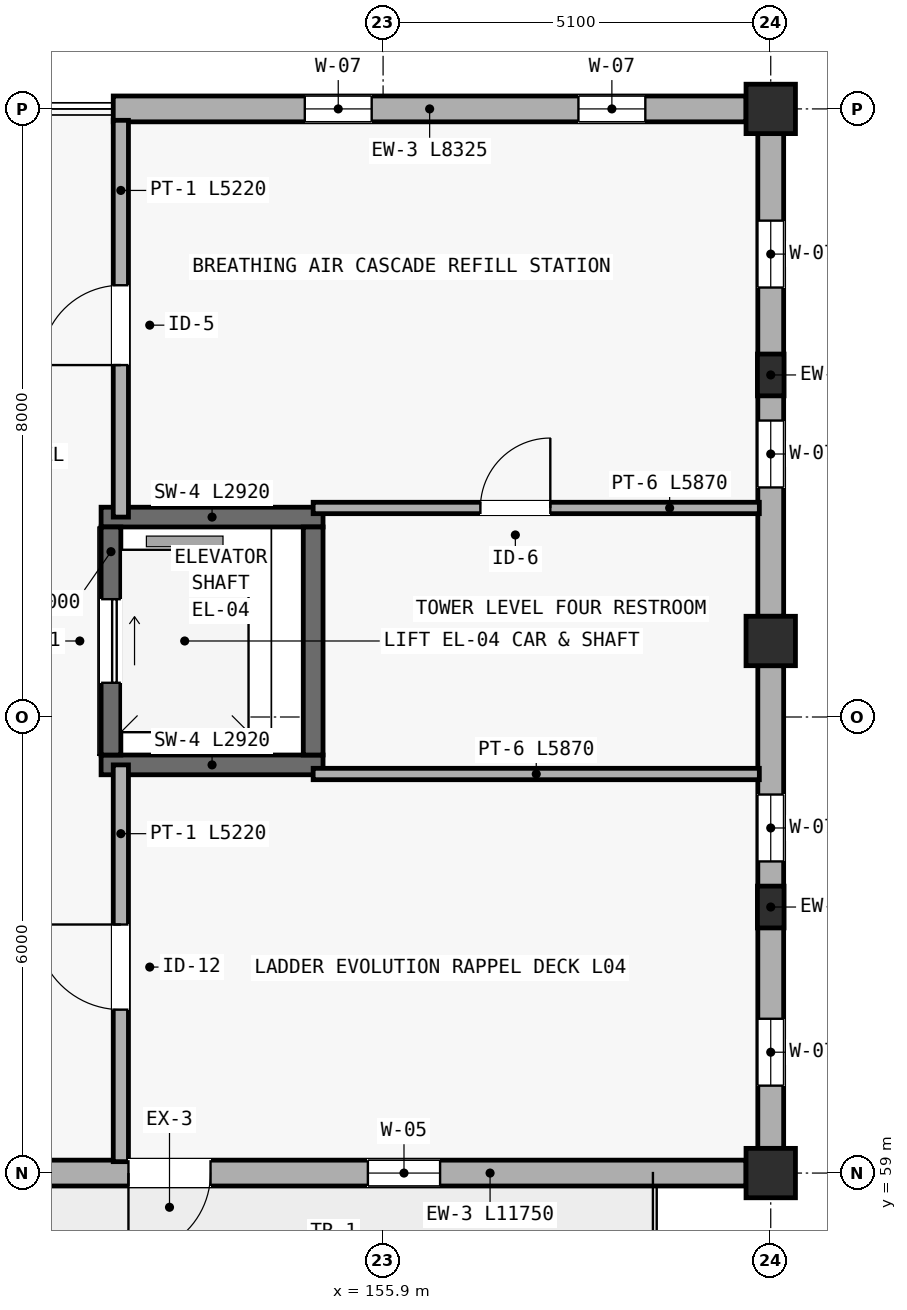
"""IFC4 building model, lengths in metres.
Left out: names, types, materials, properties, quantities, classifications, styles, units other than length and angle.
Written with IfcOpenShell. Run it as: python <this file> out.ifc"""

import sys

from ifc_helpers import new_model, si_unit, direction, frame, frame_2d, origin, origin_2d, place, context, subcontext, project, spatial, rectangle, extrude, element, fill, save


model = new_model("IFC4")
c1 = context("Model", 3, precision=1e-05, world=origin(), true_north=direction((0.0, 1.0)))
c2 = subcontext(c1, "Body", "Model", "MODEL_VIEW")
j1 = project(units=[si_unit("LENGTHUNIT", "METRE"), si_unit("PLANEANGLEUNIT", "RADIAN")], contexts=[c1])
p1 = place(None, origin())
s1 = spatial("IfcSite", under=j1, at=p1, CompositionType="ELEMENT")
p2 = place(p1, origin())
s2 = spatial("IfcBuilding", under=s1, at=p2, CompositionType="ELEMENT")
p3 = place(p2, frame((0.0, 0.0, 12.75)))
s3 = spatial("IfcBuildingStorey", under=s2, at=p3, CompositionType="ELEMENT", Elevation=12.75)
for number, where, z_axis, x_axis in (
    (1, (161.0, 59.0, 0.0), (0.0, 0.0, 1.0), (1.0, 0.0, 0.0)),
    (2, (161.0, 66.0, 0.0), (0.0, 0.0, 1.0), (1.0, 0.0, 0.0)),
    (3, (161.0, 73.0, 0.0), (0.0, 0.0, 1.0), (1.0, 0.0, 0.0)),
):
    element("IfcColumn", number, at=place(p3, frame(where, z_axis=z_axis, x_axis=x_axis)), inside=s3, PredefinedType="COLUMN", context=c2, shape_type="SweptSolid", body=[
        extrude(rectangle(XDim=0.65, YDim=0.65, at=origin_2d()), origin(), (0.0, 0.0, 1.0), 4.65),
    ])
for number, where, z_axis, x_axis in (
    (4, (161.0, 62.5, 0.0), (0.0, 0.0, 1.0), (1.0, 0.0, 0.0)),
    (5, (161.0, 69.5, 0.0), (0.0, 0.0, 1.0), (1.0, 0.0, 0.0)),
):
    element("IfcColumn", number, at=place(p3, frame(where, z_axis=z_axis, x_axis=x_axis)), inside=s3, PredefinedType="PILASTER", context=c2, shape_type="SweptSolid", body=[
        extrude(rectangle(XDim=0.35, YDim=0.55, at=origin_2d()), origin(), (0.0, 0.0, 1.0), 4.65),
    ])
p4 = place(p3, frame((148.925, 59.0, 0.0), z_axis=(0.0, 0.0, 1.0), x_axis=(1.0, 0.0, 0.0)))
e6 = element("IfcWall", 6, at=p4, inside=s3, PredefinedType="STANDARD", context=c2, shape_type="SweptSolid", body=[
    extrude(rectangle(XDim=11.75, YDim=0.34, at=frame_2d((5.875, 0.0))), origin(), (0.0, 0.0, 1.0), 3.95),
])
p5 = place(p4, frame((3.625, 0.0, 0.0)))
e7 = element("IfcOpeningElement", 7, at=p5, cuts=e6, PredefinedType="OPENING", context=c2, shape_type="SweptSolid", body=[
    extrude(rectangle(XDim=1.08, YDim=2.1, at=frame_2d((0.54, 1.05))), frame((0.0, 0.18, 0.0), z_axis=(0.0, -1.0, 0.0), x_axis=(1.0, 0.0, 0.0)), (0.0, 0.0, 1.0), 0.36),
])
p6 = place(p4, frame((1.175, 0.0, 0.75)))
e8 = element("IfcOpeningElement", 8, at=p6, cuts=e6, PredefinedType="OPENING", context=c2, shape_type="SweptSolid", body=[
    extrude(rectangle(XDim=0.95, YDim=1.35, at=frame_2d((0.475, 0.675))), frame((0.0, 0.18, 0.0), z_axis=(0.0, -1.0, 0.0), x_axis=(1.0, 0.0, 0.0)), (0.0, 0.0, 1.0), 0.36),
])
p7 = place(p4, frame((6.775, 0.0, 0.75)))
e9 = element("IfcOpeningElement", 9, at=p7, cuts=e6, PredefinedType="OPENING", context=c2, shape_type="SweptSolid", body=[
    extrude(rectangle(XDim=0.95, YDim=1.35, at=frame_2d((0.475, 0.675))), frame((0.0, 0.18, 0.0), z_axis=(0.0, -1.0, 0.0), x_axis=(1.0, 0.0, 0.0)), (0.0, 0.0, 1.0), 0.36),
])
p8 = place(p3, frame((160.675, 73.0, 0.0), z_axis=(0.0, 0.0, 1.0), x_axis=(-1.0, 0.0, 0.0)))
e10 = element("IfcWall", 10, at=p8, inside=s3, PredefinedType="STANDARD", context=c2, shape_type="SweptSolid", body=[
    extrude(rectangle(XDim=8.325, YDim=0.34, at=frame_2d((4.163, 0.0))), origin(), (0.0, 0.0, 1.0), 3.95),
])
p9 = place(p8, frame((1.325, 0.0, 0.75)))
e11 = element("IfcOpeningElement", 11, at=p9, cuts=e10, PredefinedType="OPENING", context=c2, shape_type="SweptSolid", body=[
    extrude(rectangle(XDim=0.88, YDim=1.5, at=frame_2d((0.44, 0.75))), frame((0.0, 0.18, 0.0), z_axis=(0.0, -1.0, 0.0), x_axis=(1.0, 0.0, 0.0)), (0.0, 0.0, 1.0), 0.36),
])
p10 = place(p8, frame((4.925, 0.0, 0.75)))
e12 = element("IfcOpeningElement", 12, at=p10, cuts=e10, PredefinedType="OPENING", context=c2, shape_type="SweptSolid", body=[
    extrude(rectangle(XDim=0.88, YDim=1.5, at=frame_2d((0.44, 0.75))), frame((0.0, 0.18, 0.0), z_axis=(0.0, -1.0, 0.0), x_axis=(1.0, 0.0, 0.0)), (0.0, 0.0, 1.0), 0.36),
])
p11 = place(p3, frame((161.0, 59.325, 0.0), z_axis=(0.0, 0.0, 1.0), x_axis=(0.0, 1.0, 0.0)))
e13 = element("IfcWall", 13, at=p11, inside=s3, PredefinedType="STANDARD", context=c2, shape_type="SweptSolid", body=[
    extrude(rectangle(XDim=6.35, YDim=0.34, at=frame_2d((3.175, 0.0))), origin(), (0.0, 0.0, 1.0), 3.95),
])
p12 = place(p11, frame((0.825, 0.0, 0.75)))
e14 = element("IfcOpeningElement", 14, at=p12, cuts=e13, PredefinedType="OPENING", context=c2, shape_type="SweptSolid", body=[
    extrude(rectangle(XDim=0.88, YDim=1.5, at=frame_2d((0.44, 0.75))), frame((0.0, 0.18, 0.0), z_axis=(0.0, -1.0, 0.0), x_axis=(1.0, 0.0, 0.0)), (0.0, 0.0, 1.0), 0.36),
])
p13 = place(p11, frame((3.775, 0.0, 0.75)))
e15 = element("IfcOpeningElement", 15, at=p13, cuts=e13, PredefinedType="OPENING", context=c2, shape_type="SweptSolid", body=[
    extrude(rectangle(XDim=0.88, YDim=1.5, at=frame_2d((0.44, 0.75))), frame((0.0, 0.18, 0.0), z_axis=(0.0, -1.0, 0.0), x_axis=(1.0, 0.0, 0.0)), (0.0, 0.0, 1.0), 0.36),
])
p14 = place(p3, frame((161.0, 66.325, 0.0), z_axis=(0.0, 0.0, 1.0), x_axis=(0.0, 1.0, 0.0)))
e16 = element("IfcWall", 16, at=p14, inside=s3, PredefinedType="STANDARD", context=c2, shape_type="SweptSolid", body=[
    extrude(rectangle(XDim=6.35, YDim=0.34, at=frame_2d((3.175, 0.0))), origin(), (0.0, 0.0, 1.0), 3.95),
])
p15 = place(p14, frame((1.695, 0.0, 0.75)))
e17 = element("IfcOpeningElement", 17, at=p15, cuts=e16, PredefinedType="OPENING", context=c2, shape_type="SweptSolid", body=[
    extrude(rectangle(XDim=0.88, YDim=1.5, at=frame_2d((0.44, 0.75))), frame((0.0, 0.18, 0.0), z_axis=(0.0, -1.0, 0.0), x_axis=(1.0, 0.0, 0.0)), (0.0, 0.0, 1.0), 0.36),
])
p16 = place(p14, frame((4.325, 0.0, 0.75)))
e18 = element("IfcOpeningElement", 18, at=p16, cuts=e16, PredefinedType="OPENING", context=c2, shape_type="SweptSolid", body=[
    extrude(rectangle(XDim=0.88, YDim=1.5, at=frame_2d((0.44, 0.75))), frame((0.0, 0.18, 0.0), z_axis=(0.0, -1.0, 0.0), x_axis=(1.0, 0.0, 0.0)), (0.0, 0.0, 1.0), 0.36),
])
for number, where, z_axis, x_axis in (
    (19, (152.19, 64.37, 0.0), (0.0, 0.0, 1.0), (1.0, 0.0, 0.0)),
    (20, (155.11, 67.63, 0.0), (0.0, 0.0, 1.0), (-1.0, 0.0, 0.0)),
):
    element("IfcWall", number, at=place(p3, frame(where, z_axis=z_axis, x_axis=x_axis)), inside=s3, PredefinedType="SHEAR", context=c2, shape_type="SweptSolid", body=[
        extrude(rectangle(XDim=2.92, YDim=0.26, at=frame_2d((1.46, 0.0))), origin(), (0.0, 0.0, 1.0), 4.4),
    ])
p17 = place(p3, frame((152.32, 67.5, 0.0), z_axis=(0.0, 0.0, 1.0), x_axis=(0.0, -1.0, 0.0)))
e21 = element("IfcWall", 21, at=p17, inside=s3, PredefinedType="SHEAR", context=c2, shape_type="SweptSolid", body=[
    extrude(rectangle(XDim=3.0, YDim=0.26, at=frame_2d((1.5, 0.0))), origin(), (0.0, 0.0, 1.0), 4.4),
])
p18 = place(p17, frame((0.95, 0.0, 0.0)))
e22 = element("IfcOpeningElement", 22, at=p18, cuts=e21, PredefinedType="OPENING", context=c2, shape_type="SweptSolid", body=[
    extrude(rectangle(XDim=1.1, YDim=2.15, at=frame_2d((0.55, 1.075))), frame((0.0, 0.14, 0.0), z_axis=(0.0, -1.0, 0.0), x_axis=(1.0, 0.0, 0.0)), (0.0, 0.0, 1.0), 0.28),
])
p19 = place(p3, frame((154.98, 64.5, 0.0), z_axis=(0.0, 0.0, 1.0), x_axis=(0.0, 1.0, 0.0)))
e23 = element("IfcWall", 23, at=p19, inside=s3, PredefinedType="SHEAR", context=c2, shape_type="SweptSolid", body=[
    extrude(rectangle(XDim=3.0, YDim=0.26, at=frame_2d((1.5, 0.0))), origin(), (0.0, 0.0, 1.0), 4.4),
])
p20 = place(p3, frame((152.45, 59.15, 0.0), z_axis=(0.0, 0.0, 1.0), x_axis=(0.0, 1.0, 0.0)))
e24 = element("IfcWall", 24, at=p20, inside=s3, PredefinedType="PARTITIONING", context=c2, shape_type="SweptSolid", body=[
    extrude(rectangle(XDim=5.22, YDim=0.2, at=frame_2d((2.61, 0.0))), origin(), (0.0, 0.0, 1.0), 3.9),
])
p21 = place(p20, frame((2.0, 0.0, 0.0)))
e25 = element("IfcOpeningElement", 25, at=p21, cuts=e24, PredefinedType="OPENING", context=c2, shape_type="SweptSolid", body=[
    extrude(rectangle(XDim=1.12, YDim=2.15, at=frame_2d((0.56, 1.075))), frame((0.0, 0.11, 0.0), z_axis=(0.0, -1.0, 0.0), x_axis=(1.0, 0.0, 0.0)), (0.0, 0.0, 1.0), 0.22),
])
p22 = place(p3, frame((152.45, 67.63, 0.0), z_axis=(0.0, 0.0, 1.0), x_axis=(0.0, 1.0, 0.0)))
e26 = element("IfcWall", 26, at=p22, inside=s3, PredefinedType="PARTITIONING", context=c2, shape_type="SweptSolid", body=[
    extrude(rectangle(XDim=5.22, YDim=0.2, at=frame_2d((2.61, 0.0))), origin(), (0.0, 0.0, 1.0), 3.9),
])
p23 = place(p22, frame((2.0, 0.0, 0.0)))
e27 = element("IfcOpeningElement", 27, at=p23, cuts=e26, PredefinedType="OPENING", context=c2, shape_type="SweptSolid", body=[
    extrude(rectangle(XDim=1.05, YDim=2.14, at=frame_2d((0.525, 1.07))), frame((0.0, 0.11, 0.0), z_axis=(0.0, -1.0, 0.0), x_axis=(1.0, 0.0, 0.0)), (0.0, 0.0, 1.0), 0.22),
])
p24 = place(p3, frame((154.98, 64.25, 0.0), z_axis=(0.0, 0.0, 1.0), x_axis=(1.0, 0.0, 0.0)))
e28 = element("IfcWall", 28, at=p24, inside=s3, PredefinedType="PARTITIONING", context=c2, shape_type="SweptSolid", body=[
    extrude(rectangle(XDim=5.87, YDim=0.15, at=frame_2d((2.935, 0.0))), origin(), (0.0, 0.0, 1.0), 3.9),
])
p25 = place(p3, frame((154.98, 67.75, 0.0), z_axis=(0.0, 0.0, 1.0), x_axis=(1.0, 0.0, 0.0)))
e29 = element("IfcWall", 29, at=p25, inside=s3, PredefinedType="PARTITIONING", context=c2, shape_type="SweptSolid", body=[
    extrude(rectangle(XDim=5.87, YDim=0.15, at=frame_2d((2.935, 0.0))), origin(), (0.0, 0.0, 1.0), 3.9),
])
p26 = place(p25, frame((2.2, 0.0, 0.0)))
e30 = element("IfcOpeningElement", 30, at=p26, cuts=e29, PredefinedType="OPENING", context=c2, shape_type="SweptSolid", body=[
    extrude(rectangle(XDim=0.92, YDim=2.1, at=frame_2d((0.46, 1.05))), frame((0.0, 0.085, 0.0), z_axis=(0.0, -1.0, 0.0), x_axis=(1.0, 0.0, 0.0)), (0.0, 0.0, 1.0), 0.17),
])
p27 = place(p5, frame((1.08, 0.0, 0.0), z_axis=(0.0, 0.0, 1.0), x_axis=(-1.0, 0.0, 0.0)))
e31 = element("IfcDoor", 31, at=p27, inside=s3, OperationType="SINGLE_SWING_LEFT", PredefinedType="DOOR", context=c2, shape_type="SweptSolid", body=[
    extrude(rectangle(XDim=1.08, YDim=2.1, at=frame_2d((0.54, 1.05))), frame((0.0, 0.025, 0.0), z_axis=(0.0, -1.0, 0.0), x_axis=(1.0, 0.0, 0.0)), (0.0, 0.0, 1.0), 0.05),
])
fill(e7, e31)
p28 = place(p7, origin())
e32 = element("IfcWindow", 32, at=p28, inside=s3, PartitioningType="SINGLE_PANEL", PredefinedType="WINDOW", context=c2, shape_type="SweptSolid", body=[
    extrude(rectangle(XDim=0.95, YDim=1.35, at=frame_2d((0.475, 0.675))), frame((0.0, 0.03, 0.0), z_axis=(0.0, -1.0, 0.0), x_axis=(1.0, 0.0, 0.0)), (0.0, 0.0, 1.0), 0.06),
])
fill(e9, e32)
p29 = place(p9, origin())
e33 = element("IfcWindow", 33, at=p29, inside=s3, PartitioningType="SINGLE_PANEL", PredefinedType="WINDOW", context=c2, shape_type="SweptSolid", body=[
    extrude(rectangle(XDim=0.88, YDim=1.5, at=frame_2d((0.44, 0.75))), frame((0.0, 0.03, 0.0), z_axis=(0.0, -1.0, 0.0), x_axis=(1.0, 0.0, 0.0)), (0.0, 0.0, 1.0), 0.06),
])
fill(e11, e33)
p30 = place(p10, origin())
e34 = element("IfcWindow", 34, at=p30, inside=s3, PartitioningType="SINGLE_PANEL", PredefinedType="WINDOW", context=c2, shape_type="SweptSolid", body=[
    extrude(rectangle(XDim=0.88, YDim=1.5, at=frame_2d((0.44, 0.75))), frame((0.0, 0.03, 0.0), z_axis=(0.0, -1.0, 0.0), x_axis=(1.0, 0.0, 0.0)), (0.0, 0.0, 1.0), 0.06),
])
fill(e12, e34)
p31 = place(p12, origin())
e35 = element("IfcWindow", 35, at=p31, inside=s3, PartitioningType="SINGLE_PANEL", PredefinedType="WINDOW", context=c2, shape_type="SweptSolid", body=[
    extrude(rectangle(XDim=0.88, YDim=1.5, at=frame_2d((0.44, 0.75))), frame((0.0, 0.03, 0.0), z_axis=(0.0, -1.0, 0.0), x_axis=(1.0, 0.0, 0.0)), (0.0, 0.0, 1.0), 0.06),
])
fill(e14, e35)
p32 = place(p13, origin())
e36 = element("IfcWindow", 36, at=p32, inside=s3, PartitioningType="SINGLE_PANEL", PredefinedType="WINDOW", context=c2, shape_type="SweptSolid", body=[
    extrude(rectangle(XDim=0.88, YDim=1.5, at=frame_2d((0.44, 0.75))), frame((0.0, 0.03, 0.0), z_axis=(0.0, -1.0, 0.0), x_axis=(1.0, 0.0, 0.0)), (0.0, 0.0, 1.0), 0.06),
])
fill(e15, e36)
p33 = place(p15, origin())
e37 = element("IfcWindow", 37, at=p33, inside=s3, PartitioningType="SINGLE_PANEL", PredefinedType="WINDOW", context=c2, shape_type="SweptSolid", body=[
    extrude(rectangle(XDim=0.88, YDim=1.5, at=frame_2d((0.44, 0.75))), frame((0.0, 0.03, 0.0), z_axis=(0.0, -1.0, 0.0), x_axis=(1.0, 0.0, 0.0)), (0.0, 0.0, 1.0), 0.06),
])
fill(e17, e37)
p34 = place(p16, origin())
e38 = element("IfcWindow", 38, at=p34, inside=s3, PartitioningType="SINGLE_PANEL", PredefinedType="WINDOW", context=c2, shape_type="SweptSolid", body=[
    extrude(rectangle(XDim=0.88, YDim=1.5, at=frame_2d((0.44, 0.75))), frame((0.0, 0.03, 0.0), z_axis=(0.0, -1.0, 0.0), x_axis=(1.0, 0.0, 0.0)), (0.0, 0.0, 1.0), 0.06),
])
fill(e18, e38)
p35 = place(p18, origin())
e39 = element("IfcDoor", 39, at=p35, inside=s3, OperationType="SLIDING_TO_LEFT", PredefinedType="DOOR", context=c2, shape_type="SweptSolid", body=[
    extrude(rectangle(XDim=1.1, YDim=2.15, at=frame_2d((0.55, 1.075))), frame((0.0, 0.025, 0.0), z_axis=(0.0, -1.0, 0.0), x_axis=(1.0, 0.0, 0.0)), (0.0, 0.0, 1.0), 0.05),
])
fill(e22, e39)
p36 = place(p21, origin())
e40 = element("IfcDoor", 40, at=p36, inside=s3, OperationType="SINGLE_SWING_RIGHT", PredefinedType="DOOR", context=c2, shape_type="SweptSolid", body=[
    extrude(rectangle(XDim=1.12, YDim=2.15, at=frame_2d((0.56, 1.075))), frame((0.0, 0.025, 0.0), z_axis=(0.0, -1.0, 0.0), x_axis=(1.0, 0.0, 0.0)), (0.0, 0.0, 1.0), 0.05),
])
fill(e25, e40)
p37 = place(p23, origin())
e41 = element("IfcDoor", 41, at=p37, inside=s3, OperationType="SINGLE_SWING_LEFT", PredefinedType="DOOR", context=c2, shape_type="SweptSolid", body=[
    extrude(rectangle(XDim=1.05, YDim=2.14, at=frame_2d((0.525, 1.07))), frame((0.0, 0.025, 0.0), z_axis=(0.0, -1.0, 0.0), x_axis=(1.0, 0.0, 0.0)), (0.0, 0.0, 1.0), 0.05),
])
fill(e27, e41)
p38 = place(p26, origin())
e42 = element("IfcDoor", 42, at=p38, inside=s3, OperationType="SINGLE_SWING_RIGHT", PredefinedType="DOOR", context=c2, shape_type="SweptSolid", body=[
    extrude(rectangle(XDim=0.92, YDim=2.1, at=frame_2d((0.46, 1.05))), frame((0.0, 0.025, 0.0), z_axis=(0.0, -1.0, 0.0), x_axis=(1.0, 0.0, 0.0)), (0.0, 0.0, 1.0), 0.05),
])
fill(e30, e42)
save(model, sys.argv[1])
